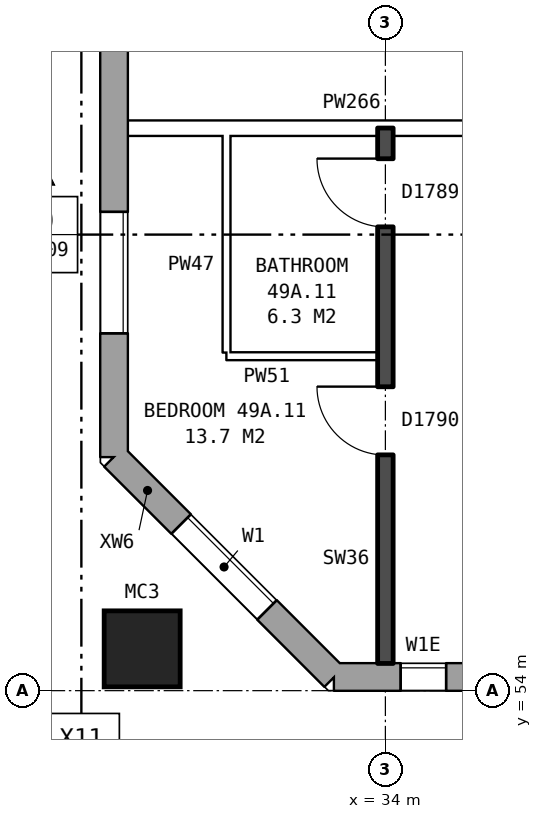
"""IFC4 building model, lengths in metres.
Left out: names, types, materials, properties, quantities, classifications, styles, units other than length and angle.
Written with IfcOpenShell. Run it as: python <this file> out.ifc"""

import sys

from ifc_helpers import new_model, si_unit, direction, frame, frame_2d, origin, origin_2d, place, context, subcontext, project, spatial, rectangle, hollow_rectangle, extrude, element, fill, save


model = new_model("IFC4")
c1 = context("Model", 3, precision=1e-05, world=origin(), true_north=direction((0.0, 1.0)))
c2 = subcontext(c1, "Body", "Model", "MODEL_VIEW")
j1 = project(units=[si_unit("LENGTHUNIT", "METRE"), si_unit("PLANEANGLEUNIT", "RADIAN")], contexts=[c1])
p1 = place(None, origin())
s1 = spatial("IfcSite", under=j1, at=p1, CompositionType="ELEMENT")
p2 = place(p1, origin())
s2 = spatial("IfcBuilding", under=s1, at=p2, CompositionType="ELEMENT")
p3 = place(p2, frame((0.0, 0.0, 175.8)))
s3 = spatial("IfcBuildingStorey", under=s2, at=p3, CompositionType="ELEMENT", Elevation=175.8)
p4 = place(p3, frame((30.8, 54.55, 0.0), z_axis=(0.0, 0.0, 1.0), x_axis=(1.0, 0.0, 0.0)))
e1 = element("IfcColumn", 1, at=p4, inside=s3, PredefinedType="COLUMN", context=c2, shape_type="SweptSolid", body=[
    extrude(hollow_rectangle(XDim=1.0, YDim=1.0, WallThickness=0.055, at=origin_2d()), origin(), (0.0, 0.0, 1.0), 3.1),
])
p5 = place(p3, frame((30.43, 57.075, 0.0), z_axis=(0.0, 0.0, 1.0), x_axis=(0.707106781187, -0.707106781187, 0.0)))
e2 = element("IfcWall", 2, at=p5, inside=s3, PredefinedType="STANDARD", context=c2, shape_type="SweptSolid", body=[
    extrude(rectangle(XDim=4.094, YDim=0.36, at=frame_2d((2.047, 0.0))), origin(), (0.0, 0.0, 1.0), 2.85),
])
p6 = place(p5, frame((1.247, 0.0, 0.8)))
e3 = element("IfcOpeningElement", 3, at=p6, cuts=e2, PredefinedType="OPENING", context=c2, shape_type="SweptSolid", body=[
    extrude(rectangle(XDim=1.6, YDim=1.8, at=frame_2d((0.8, 0.9))), frame((0.0, 0.19, 0.0), z_axis=(0.0, -1.0, 0.0), x_axis=(1.0, 0.0, 0.0)), (0.0, 0.0, 1.0), 0.38),
])
p7 = place(p3, frame((33.325, 54.18, 0.0), z_axis=(0.0, 0.0, 1.0), x_axis=(1.0, 0.0, 0.0)))
e4 = element("IfcWall", 4, at=p7, inside=s3, PredefinedType="STANDARD", context=c2, shape_type="SweptSolid", body=[
    extrude(rectangle(XDim=39.601, YDim=0.36, at=frame_2d((19.8, 0.0))), origin(), (0.0, 0.0, 1.0), 2.85),
])
p8 = place(p7, frame((0.875, 0.0, 0.8)))
e5 = element("IfcOpeningElement", 5, at=p8, cuts=e4, PredefinedType="OPENING", context=c2, shape_type="SweptSolid", body=[
    extrude(rectangle(XDim=0.6, YDim=1.8, at=frame_2d((0.3, 0.9))), frame((0.0, 0.19, 0.0), z_axis=(0.0, -1.0, 0.0), x_axis=(1.0, 0.0, 0.0)), (0.0, 0.0, 1.0), 0.38),
])
p9 = place(p7, frame((4.375, 0.0, 0.8)))
e6 = element("IfcOpeningElement", 6, at=p9, cuts=e4, PredefinedType="OPENING", context=c2, shape_type="SweptSolid", body=[
    extrude(rectangle(XDim=1.6, YDim=1.8, at=frame_2d((0.8, 0.9))), frame((0.0, 0.19, 0.0), z_axis=(0.0, -1.0, 0.0), x_axis=(1.0, 0.0, 0.0)), (0.0, 0.0, 1.0), 0.38),
])
p10 = place(p7, frame((7.375, 0.0, 0.8)))
e7 = element("IfcOpeningElement", 7, at=p10, cuts=e4, PredefinedType="OPENING", context=c2, shape_type="SweptSolid", body=[
    extrude(rectangle(XDim=1.6, YDim=1.8, at=frame_2d((0.8, 0.9))), frame((0.0, 0.19, 0.0), z_axis=(0.0, -1.0, 0.0), x_axis=(1.0, 0.0, 0.0)), (0.0, 0.0, 1.0), 0.38),
])
p11 = place(p7, frame((10.375, 0.0, 0.8)))
e8 = element("IfcOpeningElement", 8, at=p11, cuts=e4, PredefinedType="OPENING", context=c2, shape_type="SweptSolid", body=[
    extrude(rectangle(XDim=1.6, YDim=1.8, at=frame_2d((0.8, 0.9))), frame((0.0, 0.19, 0.0), z_axis=(0.0, -1.0, 0.0), x_axis=(1.0, 0.0, 0.0)), (0.0, 0.0, 1.0), 0.38),
])
p12 = place(p7, frame((13.375, 0.0, 0.8)))
e9 = element("IfcOpeningElement", 9, at=p12, cuts=e4, PredefinedType="OPENING", context=c2, shape_type="SweptSolid", body=[
    extrude(rectangle(XDim=1.6, YDim=1.8, at=frame_2d((0.8, 0.9))), frame((0.0, 0.19, 0.0), z_axis=(0.0, -1.0, 0.0), x_axis=(1.0, 0.0, 0.0)), (0.0, 0.0, 1.0), 0.38),
])
p13 = place(p7, frame((16.375, 0.0, 0.8)))
e10 = element("IfcOpeningElement", 10, at=p13, cuts=e4, PredefinedType="OPENING", context=c2, shape_type="SweptSolid", body=[
    extrude(rectangle(XDim=1.6, YDim=1.8, at=frame_2d((0.8, 0.9))), frame((0.0, 0.19, 0.0), z_axis=(0.0, -1.0, 0.0), x_axis=(1.0, 0.0, 0.0)), (0.0, 0.0, 1.0), 0.38),
])
p14 = place(p7, frame((19.375, 0.0, 0.8)))
e11 = element("IfcOpeningElement", 11, at=p14, cuts=e4, PredefinedType="OPENING", context=c2, shape_type="SweptSolid", body=[
    extrude(rectangle(XDim=1.6, YDim=1.8, at=frame_2d((0.8, 0.9))), frame((0.0, 0.19, 0.0), z_axis=(0.0, -1.0, 0.0), x_axis=(1.0, 0.0, 0.0)), (0.0, 0.0, 1.0), 0.38),
])
p15 = place(p7, frame((22.375, 0.0, 0.8)))
e12 = element("IfcOpeningElement", 12, at=p15, cuts=e4, PredefinedType="OPENING", context=c2, shape_type="SweptSolid", body=[
    extrude(rectangle(XDim=1.6, YDim=1.8, at=frame_2d((0.8, 0.9))), frame((0.0, 0.19, 0.0), z_axis=(0.0, -1.0, 0.0), x_axis=(1.0, 0.0, 0.0)), (0.0, 0.0, 1.0), 0.38),
])
p16 = place(p7, frame((25.375, 0.0, 0.8)))
e13 = element("IfcOpeningElement", 13, at=p16, cuts=e4, PredefinedType="OPENING", context=c2, shape_type="SweptSolid", body=[
    extrude(rectangle(XDim=1.6, YDim=1.8, at=frame_2d((0.8, 0.9))), frame((0.0, 0.19, 0.0), z_axis=(0.0, -1.0, 0.0), x_axis=(1.0, 0.0, 0.0)), (0.0, 0.0, 1.0), 0.38),
])
p17 = place(p7, frame((28.375, 0.0, 0.8)))
e14 = element("IfcOpeningElement", 14, at=p17, cuts=e4, PredefinedType="OPENING", context=c2, shape_type="SweptSolid", body=[
    extrude(rectangle(XDim=1.6, YDim=1.8, at=frame_2d((0.8, 0.9))), frame((0.0, 0.19, 0.0), z_axis=(0.0, -1.0, 0.0), x_axis=(1.0, 0.0, 0.0)), (0.0, 0.0, 1.0), 0.38),
])
p18 = place(p7, frame((31.375, 0.0, 0.8)))
e15 = element("IfcOpeningElement", 15, at=p18, cuts=e4, PredefinedType="OPENING", context=c2, shape_type="SweptSolid", body=[
    extrude(rectangle(XDim=1.6, YDim=1.8, at=frame_2d((0.8, 0.9))), frame((0.0, 0.19, 0.0), z_axis=(0.0, -1.0, 0.0), x_axis=(1.0, 0.0, 0.0)), (0.0, 0.0, 1.0), 0.38),
])
p19 = place(p7, frame((33.275, 0.0, 0.8)))
e16 = element("IfcOpeningElement", 16, at=p19, cuts=e4, PredefinedType="OPENING", context=c2, shape_type="SweptSolid", body=[
    extrude(rectangle(XDim=1.6, YDim=1.8, at=frame_2d((0.8, 0.9))), frame((0.0, 0.19, 0.0), z_axis=(0.0, -1.0, 0.0), x_axis=(1.0, 0.0, 0.0)), (0.0, 0.0, 1.0), 0.38),
])
p20 = place(p7, frame((37.025, 0.0, 1.7)))
e17 = element("IfcOpeningElement", 17, at=p20, cuts=e4, PredefinedType="OPENING", context=c2, shape_type="SweptSolid", body=[
    extrude(rectangle(XDim=0.6, YDim=0.9, at=frame_2d((0.3, 0.45))), frame((0.0, 0.19, 0.0), z_axis=(0.0, -1.0, 0.0), x_axis=(1.0, 0.0, 0.0)), (0.0, 0.0, 1.0), 0.38),
])
p21 = place(p7, frame((1.775, 0.0, 1.7)))
e18 = element("IfcOpeningElement", 18, at=p21, cuts=e4, PredefinedType="OPENING", context=c2, shape_type="SweptSolid", body=[
    extrude(rectangle(XDim=0.8, YDim=0.9, at=frame_2d((0.4, 0.45))), frame((0.0, 0.19, 0.0), z_axis=(0.0, -1.0, 0.0), x_axis=(1.0, 0.0, 0.0)), (0.0, 0.0, 1.0), 0.38),
])
p22 = place(p7, frame((35.175, 0.0, 0.8)))
e19 = element("IfcOpeningElement", 19, at=p22, cuts=e4, PredefinedType="OPENING", context=c2, shape_type="SweptSolid", body=[
    extrude(rectangle(XDim=0.6, YDim=0.9, at=frame_2d((0.3, 0.45))), frame((0.0, 0.19, 0.0), z_axis=(0.0, -1.0, 0.0), x_axis=(1.0, 0.0, 0.0)), (0.0, 0.0, 1.0), 0.38),
])
p23 = place(p7, frame((37.975, 0.0, 0.8)))
e20 = element("IfcOpeningElement", 20, at=p23, cuts=e4, PredefinedType="OPENING", context=c2, shape_type="SweptSolid", body=[
    extrude(rectangle(XDim=1.2, YDim=1.8, at=frame_2d((0.6, 0.9))), frame((0.0, 0.19, 0.0), z_axis=(0.0, -1.0, 0.0), x_axis=(1.0, 0.0, 0.0)), (0.0, 0.0, 1.0), 0.38),
])
p24 = place(p3, frame((30.43, 82.925, 0.0), z_axis=(0.0, 0.0, 1.0), x_axis=(0.0, -1.0, 0.0)))
e21 = element("IfcWall", 21, at=p24, inside=s3, PredefinedType="STANDARD", context=c2, shape_type="SweptSolid", body=[
    extrude(rectangle(XDim=25.851, YDim=0.36, at=frame_2d((12.925, 0.0))), origin(), (0.0, 0.0, 1.0), 2.85),
])
p25 = place(p24, frame((1.625, 0.0, 0.8)))
e22 = element("IfcOpeningElement", 22, at=p25, cuts=e21, PredefinedType="OPENING", context=c2, shape_type="SweptSolid", body=[
    extrude(rectangle(XDim=1.6, YDim=1.8, at=frame_2d((0.8, 0.9))), frame((0.0, 0.19, 0.0), z_axis=(0.0, -1.0, 0.0), x_axis=(1.0, 0.0, 0.0)), (0.0, 0.0, 1.0), 0.38),
])
p26 = place(p24, frame((5.725, 0.0, 0.8)))
e23 = element("IfcOpeningElement", 23, at=p26, cuts=e21, PredefinedType="OPENING", context=c2, shape_type="SweptSolid", body=[
    extrude(rectangle(XDim=1.6, YDim=0.9, at=frame_2d((0.8, 0.45))), frame((0.0, 0.19, 0.0), z_axis=(0.0, -1.0, 0.0), x_axis=(1.0, 0.0, 0.0)), (0.0, 0.0, 1.0), 0.38),
])
p27 = place(p24, frame((7.625, 0.0, 0.8)))
e24 = element("IfcOpeningElement", 24, at=p27, cuts=e21, PredefinedType="OPENING", context=c2, shape_type="SweptSolid", body=[
    extrude(rectangle(XDim=1.6, YDim=1.8, at=frame_2d((0.8, 0.9))), frame((0.0, 0.19, 0.0), z_axis=(0.0, -1.0, 0.0), x_axis=(1.0, 0.0, 0.0)), (0.0, 0.0, 1.0), 0.38),
])
p28 = place(p24, frame((10.625, 0.0, 0.8)))
e25 = element("IfcOpeningElement", 25, at=p28, cuts=e21, PredefinedType="OPENING", context=c2, shape_type="SweptSolid", body=[
    extrude(rectangle(XDim=1.6, YDim=1.8, at=frame_2d((0.8, 0.9))), frame((0.0, 0.19, 0.0), z_axis=(0.0, -1.0, 0.0), x_axis=(1.0, 0.0, 0.0)), (0.0, 0.0, 1.0), 0.38),
])
p29 = place(p24, frame((13.625, 0.0, 0.8)))
e26 = element("IfcOpeningElement", 26, at=p29, cuts=e21, PredefinedType="OPENING", context=c2, shape_type="SweptSolid", body=[
    extrude(rectangle(XDim=1.6, YDim=1.8, at=frame_2d((0.8, 0.9))), frame((0.0, 0.19, 0.0), z_axis=(0.0, -1.0, 0.0), x_axis=(1.0, 0.0, 0.0)), (0.0, 0.0, 1.0), 0.38),
])
p30 = place(p24, frame((16.625, 0.0, 0.8)))
e27 = element("IfcOpeningElement", 27, at=p30, cuts=e21, PredefinedType="OPENING", context=c2, shape_type="SweptSolid", body=[
    extrude(rectangle(XDim=1.6, YDim=1.8, at=frame_2d((0.8, 0.9))), frame((0.0, 0.19, 0.0), z_axis=(0.0, -1.0, 0.0), x_axis=(1.0, 0.0, 0.0)), (0.0, 0.0, 1.0), 0.38),
])
p31 = place(p24, frame((9.525, 0.0, 0.8)))
e28 = element("IfcOpeningElement", 28, at=p31, cuts=e21, PredefinedType="OPENING", context=c2, shape_type="SweptSolid", body=[
    extrude(rectangle(XDim=0.8, YDim=1.8, at=frame_2d((0.4, 0.9))), frame((0.0, 0.19, 0.0), z_axis=(0.0, -1.0, 0.0), x_axis=(1.0, 0.0, 0.0)), (0.0, 0.0, 1.0), 0.38),
])
p32 = place(p24, frame((22.625, 0.0, 0.8)))
e29 = element("IfcOpeningElement", 29, at=p32, cuts=e21, PredefinedType="OPENING", context=c2, shape_type="SweptSolid", body=[
    extrude(rectangle(XDim=1.6, YDim=1.8, at=frame_2d((0.8, 0.9))), frame((0.0, 0.19, 0.0), z_axis=(0.0, -1.0, 0.0), x_axis=(1.0, 0.0, 0.0)), (0.0, 0.0, 1.0), 0.38),
])
p33 = place(p24, frame((12.525, 0.0, 0.8)))
e30 = element("IfcOpeningElement", 30, at=p33, cuts=e21, PredefinedType="OPENING", context=c2, shape_type="SweptSolid", body=[
    extrude(rectangle(XDim=0.8, YDim=1.8, at=frame_2d((0.4, 0.9))), frame((0.0, 0.19, 0.0), z_axis=(0.0, -1.0, 0.0), x_axis=(1.0, 0.0, 0.0)), (0.0, 0.0, 1.0), 0.38),
])
p34 = place(p24, frame((15.525, 0.0, 0.8)))
e31 = element("IfcOpeningElement", 31, at=p34, cuts=e21, PredefinedType="OPENING", context=c2, shape_type="SweptSolid", body=[
    extrude(rectangle(XDim=0.8, YDim=1.8, at=frame_2d((0.4, 0.9))), frame((0.0, 0.19, 0.0), z_axis=(0.0, -1.0, 0.0), x_axis=(1.0, 0.0, 0.0)), (0.0, 0.0, 1.0), 0.38),
])
p35 = place(p24, frame((18.525, 0.0, 0.8)))
e32 = element("IfcOpeningElement", 32, at=p35, cuts=e21, PredefinedType="OPENING", context=c2, shape_type="SweptSolid", body=[
    extrude(rectangle(XDim=1.6, YDim=0.9, at=frame_2d((0.8, 0.45))), frame((0.0, 0.19, 0.0), z_axis=(0.0, -1.0, 0.0), x_axis=(1.0, 0.0, 0.0)), (0.0, 0.0, 1.0), 0.38),
])
p36 = place(p3, frame((31.91, 58.4, 0.0), z_axis=(0.0, 0.0, 1.0), x_axis=(1.0, 0.0, 0.0)))
e33 = element("IfcWall", 33, at=p36, inside=s3, PredefinedType="PARTITIONING", context=c2, shape_type="SweptSolid", body=[
    extrude(rectangle(XDim=1.99, YDim=0.1, at=frame_2d((0.995, 0.0))), origin(), (0.0, 0.0, 1.0), 2.85),
])
p37 = place(p3, frame((30.61, 61.4, 0.0), z_axis=(0.0, 0.0, 1.0), x_axis=(1.0, 0.0, 0.0)))
e34 = element("IfcWall", 34, at=p37, inside=s3, PredefinedType="PARTITIONING", context=c2, shape_type="SweptSolid", body=[
    extrude(rectangle(XDim=15.29, YDim=0.2, at=frame_2d((7.645, 0.0))), origin(), (0.0, 0.0, 1.0), 2.85),
])
p38 = place(p37, frame((10.69, 0.0, 0.0)))
e35 = element("IfcOpeningElement", 35, at=p38, cuts=e34, PredefinedType="OPENING", context=c2, shape_type="SweptSolid", body=[
    extrude(rectangle(XDim=1.0, YDim=2.1, at=frame_2d((0.5, 1.05))), frame((0.0, 0.11, 0.0), z_axis=(0.0, -1.0, 0.0), x_axis=(1.0, 0.0, 0.0)), (0.0, 0.0, 1.0), 0.22),
])
p39 = place(p37, frame((5.89, 0.0, 0.0)))
e36 = element("IfcOpeningElement", 36, at=p39, cuts=e34, PredefinedType="OPENING", context=c2, shape_type="SweptSolid", body=[
    extrude(rectangle(XDim=1.0, YDim=2.1, at=frame_2d((0.5, 1.05))), frame((0.0, 0.11, 0.0), z_axis=(0.0, -1.0, 0.0), x_axis=(1.0, 0.0, 0.0)), (0.0, 0.0, 1.0), 0.22),
])
p40 = place(p3, frame((31.91, 58.45, 0.0), z_axis=(0.0, 0.0, 1.0), x_axis=(0.0, 1.0, 0.0)))
e37 = element("IfcWall", 37, at=p40, inside=s3, PredefinedType="PARTITIONING", context=c2, shape_type="SweptSolid", body=[
    extrude(rectangle(XDim=2.85, YDim=0.1, at=frame_2d((1.425, 0.0))), origin(), (0.0, 0.0, 1.0), 2.85),
])
p41 = place(p3, frame((34.0, 54.36, 0.0), z_axis=(0.0, 0.0, 1.0), x_axis=(0.0, 1.0, 0.0)))
e38 = element("IfcWall", 38, at=p41, inside=s3, PredefinedType="SOLIDWALL", context=c2, shape_type="SweptSolid", body=[
    extrude(rectangle(XDim=7.04, YDim=0.2, at=frame_2d((3.52, 0.0))), origin(), (0.0, 0.0, 1.0), 2.85),
])
p42 = place(p41, frame((2.74, 0.0, 0.0)))
e39 = element("IfcOpeningElement", 39, at=p42, cuts=e38, PredefinedType="OPENING", context=c2, shape_type="SweptSolid", body=[
    extrude(rectangle(XDim=0.9, YDim=2.1, at=frame_2d((0.45, 1.05))), frame((0.0, 0.11, 0.0), z_axis=(0.0, -1.0, 0.0), x_axis=(1.0, 0.0, 0.0)), (0.0, 0.0, 1.0), 0.22),
])
p43 = place(p41, frame((5.74, 0.0, 0.0)))
e40 = element("IfcOpeningElement", 40, at=p43, cuts=e38, PredefinedType="OPENING", context=c2, shape_type="SweptSolid", body=[
    extrude(rectangle(XDim=0.9, YDim=2.1, at=frame_2d((0.45, 1.05))), frame((0.0, 0.11, 0.0), z_axis=(0.0, -1.0, 0.0), x_axis=(1.0, 0.0, 0.0)), (0.0, 0.0, 1.0), 0.22),
])
p44 = place(p6, origin())
e41 = element("IfcWindow", 41, at=p44, inside=s3, PartitioningType="SINGLE_PANEL", PredefinedType="WINDOW", context=c2, shape_type="SweptSolid", body=[
    extrude(rectangle(XDim=1.6, YDim=1.8, at=frame_2d((0.8, 0.9))), frame((0.0, 0.15, 0.0), z_axis=(0.0, -1.0, 0.0), x_axis=(1.0, 0.0, 0.0)), (0.0, 0.0, 1.0), 0.06),
])
fill(e3, e41)
p45 = place(p8, origin())
e42 = element("IfcWindow", 42, at=p45, inside=s3, PartitioningType="SINGLE_PANEL", PredefinedType="WINDOW", context=c2, shape_type="SweptSolid", body=[
    extrude(rectangle(XDim=0.6, YDim=1.8, at=frame_2d((0.3, 0.9))), frame((0.0, 0.15, 0.0), z_axis=(0.0, -1.0, 0.0), x_axis=(1.0, 0.0, 0.0)), (0.0, 0.0, 1.0), 0.06),
])
fill(e5, e42)
p46 = place(p32, origin())
e43 = element("IfcWindow", 43, at=p46, inside=s3, PartitioningType="SINGLE_PANEL", PredefinedType="WINDOW", context=c2, shape_type="SweptSolid", body=[
    extrude(rectangle(XDim=1.6, YDim=1.8, at=frame_2d((0.8, 0.9))), frame((0.0, 0.15, 0.0), z_axis=(0.0, -1.0, 0.0), x_axis=(1.0, 0.0, 0.0)), (0.0, 0.0, 1.0), 0.06),
])
fill(e29, e43)
p47 = place(p42, origin())
e44 = element("IfcDoor", 44, at=p47, inside=s3, OperationType="SINGLE_SWING_RIGHT", PredefinedType="DOOR", context=c2, shape_type="SweptSolid", body=[
    extrude(rectangle(XDim=0.9, YDim=2.1, at=frame_2d((0.45, 1.05))), frame((0.0, 0.025, 0.0), z_axis=(0.0, -1.0, 0.0), x_axis=(1.0, 0.0, 0.0)), (0.0, 0.0, 1.0), 0.05),
])
fill(e39, e44)
p48 = place(p43, origin())
e45 = element("IfcDoor", 45, at=p48, inside=s3, OperationType="SINGLE_SWING_RIGHT", PredefinedType="DOOR", context=c2, shape_type="SweptSolid", body=[
    extrude(rectangle(XDim=0.9, YDim=2.1, at=frame_2d((0.45, 1.05))), frame((0.0, 0.025, 0.0), z_axis=(0.0, -1.0, 0.0), x_axis=(1.0, 0.0, 0.0)), (0.0, 0.0, 1.0), 0.05),
])
fill(e40, e45)
save(model, sys.argv[1])
